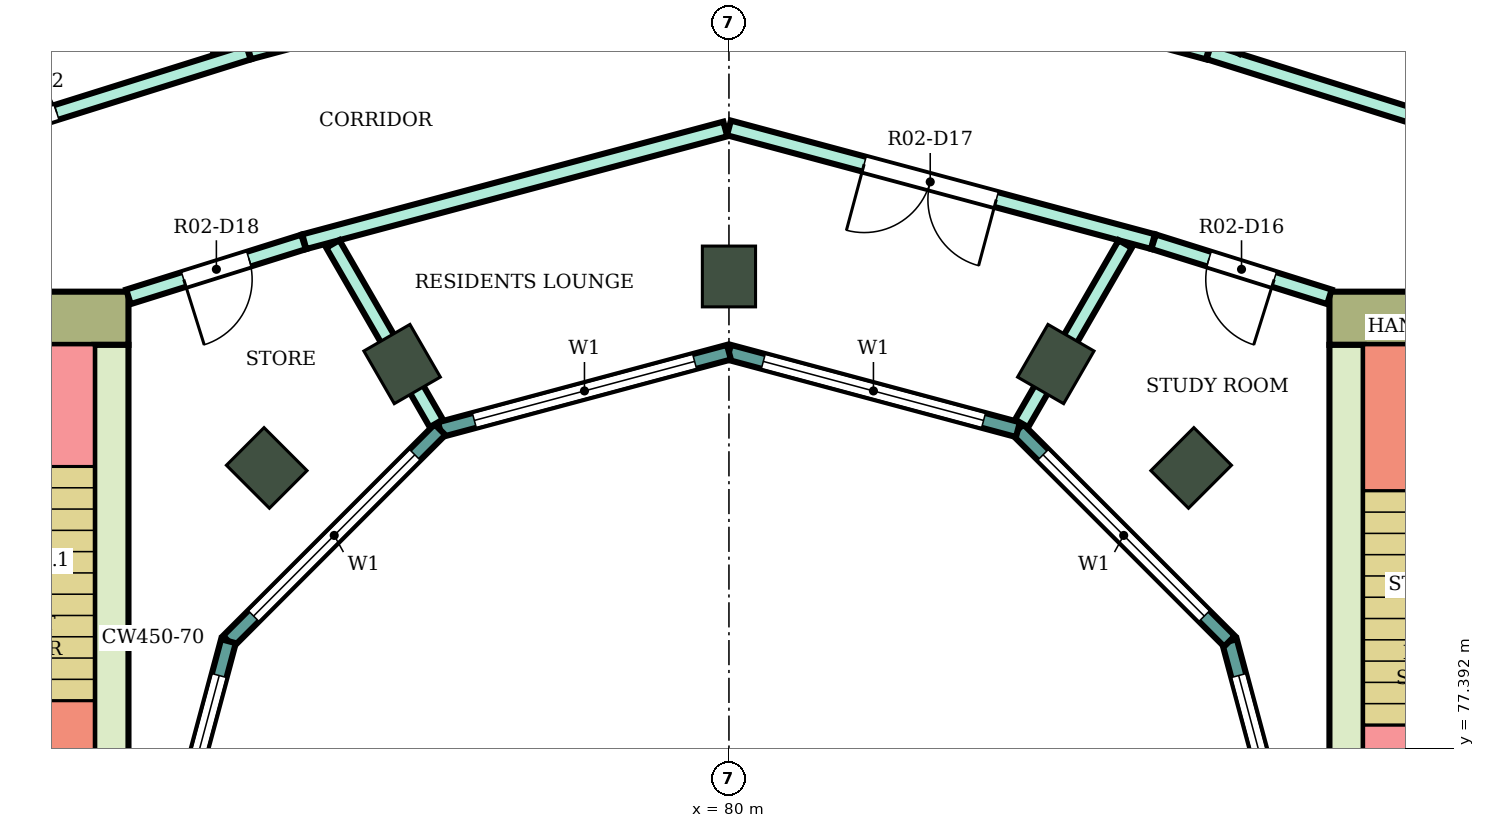
"""IFC4 building model, lengths in metres.
Left out: names, types, materials, properties, quantities, classifications, styles, units other than length and angle.
Written with IfcOpenShell. Run it as: python <this file> out.ifc"""

import sys

from ifc_helpers import new_model, si_unit, direction, frame, frame_2d, origin, origin_2d, place, context, subcontext, project, spatial, rectangle, extrude, element, fill, save


model = new_model("IFC4")
c1 = context("Model", 3, precision=1e-05, world=origin(), true_north=direction((0.0, 1.0)))
c2 = subcontext(c1, "Body", "Model", "MODEL_VIEW")
j1 = project(units=[si_unit("LENGTHUNIT", "METRE"), si_unit("PLANEANGLEUNIT", "RADIAN")], contexts=[c1])
p1 = place(None, origin())
s1 = spatial("IfcSite", under=j1, at=p1, CompositionType="ELEMENT")
p2 = place(p1, origin())
s2 = spatial("IfcBuilding", under=s1, at=p2, CompositionType="ELEMENT")
p3 = place(p2, frame((0.0, 0.0, 178.2)))
s3 = spatial("IfcBuildingStorey", under=s2, at=p3, CompositionType="ELEMENT", Elevation=178.2)
for number, where, z_axis, x_axis in (
    (1, (86.081, 81.081, 0.0), (0.0, 0.0, 1.0), (0.707, 0.707, 0.0)),
    (2, (84.3, 82.448, 0.0), (0.0, 0.0, 1.0), (0.5, 0.866, 0.0)),
    (3, (80.0, 83.6, 0.0), (0.0, 0.0, 1.0), (0.0, 1.0, 0.0)),
    (4, (75.7, 82.448, 0.0), (0.0, 0.0, 1.0), (-0.5, 0.866, 0.0)),
    (5, (73.919, 81.081, 0.0), (0.0, 0.0, 1.0), (-0.707, 0.707, 0.0)),
):
    element("IfcColumn", number, at=place(p3, frame(where, z_axis=z_axis, x_axis=x_axis)), inside=s3, PredefinedType="COLUMN", context=c2, shape_type="SweptSolid", body=[
        extrude(rectangle(XDim=0.8, YDim=0.7, at=origin_2d()), origin(), (0.0, 0.0, 1.0), 4.1),
    ])
p4 = place(p3, frame((87.9, 83.05, 0.0), z_axis=(0.0, 0.0, 1.0), x_axis=(1.0, 0.0, 0.0)))
e6 = element("IfcWall", 6, at=p4, inside=s3, PredefinedType="SHEAR", context=c2, shape_type="SweptSolid", body=[
    extrude(rectangle(XDim=14.8, YDim=0.7, at=frame_2d((7.4, 0.0))), origin(), (0.0, 0.0, 1.0), 3.78),
])
p5 = place(p4, frame((4.2, 0.0, 0.0)))
e7 = element("IfcOpeningElement", 7, at=p5, cuts=e6, PredefinedType="OPENING", context=c2, shape_type="SweptSolid", body=[
    extrude(rectangle(XDim=2.4, YDim=2.4, at=frame_2d((1.2, 1.2))), frame((0.0, 0.36, 0.0), z_axis=(0.0, -1.0, 0.0), x_axis=(1.0, 0.0, 0.0)), (0.0, 0.0, 1.0), 0.72),
])
p6 = place(p3, frame((88.125, 75.0, 0.0), z_axis=(0.0, 0.0, 1.0), x_axis=(0.0, 1.0, 0.0)))
e8 = element("IfcWall", 8, at=p6, inside=s3, PredefinedType="SHEAR", context=c2, shape_type="SweptSolid", body=[
    extrude(rectangle(XDim=7.7, YDim=0.45, at=frame_2d((3.85, 0.0))), origin(), (0.0, 0.0, 1.0), 3.78),
])
p7 = place(p3, frame((72.1, 83.05, 0.0), z_axis=(0.0, 0.0, 1.0), x_axis=(-1.0, 0.0, 0.0)))
e9 = element("IfcWall", 9, at=p7, inside=s3, PredefinedType="SHEAR", context=c2, shape_type="SweptSolid", body=[
    extrude(rectangle(XDim=14.8, YDim=0.7, at=frame_2d((7.4, 0.0))), origin(), (0.0, 0.0, 1.0), 3.78),
])
p8 = place(p7, frame((4.2, 0.0, 0.0)))
e10 = element("IfcOpeningElement", 10, at=p8, cuts=e9, PredefinedType="OPENING", context=c2, shape_type="SweptSolid", body=[
    extrude(rectangle(XDim=2.4, YDim=2.4, at=frame_2d((1.2, 1.2))), frame((0.0, 0.36, 0.0), z_axis=(0.0, -1.0, 0.0), x_axis=(1.0, 0.0, 0.0)), (0.0, 0.0, 1.0), 0.72),
])
p9 = place(p3, frame((71.875, 82.7, 0.0), z_axis=(0.0, 0.0, 1.0), x_axis=(0.0, -1.0, 0.0)))
e11 = element("IfcWall", 11, at=p9, inside=s3, PredefinedType="SHEAR", context=c2, shape_type="SweptSolid", body=[
    extrude(rectangle(XDim=7.7, YDim=0.45, at=frame_2d((3.85, 0.0))), origin(), (0.0, 0.0, 1.0), 3.78),
])
p10 = place(p3, frame((87.604, 75.0, 0.0), z_axis=(0.0, 0.0, 1.0), x_axis=(-0.258789828301, 0.965933654434, 0.0)))
e12 = element("IfcWall", 12, at=p10, inside=s3, PredefinedType="NOTDEFINED", context=c2, shape_type="SweptSolid", body=[
    extrude(rectangle(XDim=3.936, YDim=0.2, at=frame_2d((1.968, 0.0))), origin(), (0.0, 0.0, 1.0), 4.1),
])
p11 = place(p10, frame((0.468, 0.0, 0.9)))
e13 = element("IfcOpeningElement", 13, at=p11, cuts=e12, PredefinedType="OPENING", context=c2, shape_type="SweptSolid", body=[
    extrude(rectangle(XDim=3.0, YDim=2.3, at=frame_2d((1.5, 1.15))), frame((0.0, 0.11, 0.0), z_axis=(0.0, -1.0, 0.0), x_axis=(1.0, 0.0, 0.0)), (0.0, 0.0, 1.0), 0.22),
])
p12 = place(p3, frame((86.585, 78.802, 0.0), z_axis=(0.0, 0.0, 1.0), x_axis=(-0.707106781187, 0.707106781187, 0.0)))
e14 = element("IfcWall", 14, at=p12, inside=s3, PredefinedType="NOTDEFINED", context=c2, shape_type="SweptSolid", body=[
    extrude(rectangle(XDim=3.936, YDim=0.2, at=frame_2d((1.968, 0.0))), origin(), (0.0, 0.0, 1.0), 4.1),
])
p13 = place(p12, frame((0.468, 0.0, 0.9)))
e15 = element("IfcOpeningElement", 15, at=p13, cuts=e14, PredefinedType="OPENING", context=c2, shape_type="SweptSolid", body=[
    extrude(rectangle(XDim=3.0, YDim=2.3, at=frame_2d((1.5, 1.15))), frame((0.0, 0.11, 0.0), z_axis=(0.0, -1.0, 0.0), x_axis=(1.0, 0.0, 0.0)), (0.0, 0.0, 1.0), 0.22),
])
p14 = place(p3, frame((83.802, 81.585, 0.0), z_axis=(0.0, 0.0, 1.0), x_axis=(-0.965933654434, 0.258789828301, 0.0)))
e16 = element("IfcWall", 16, at=p14, inside=s3, PredefinedType="NOTDEFINED", context=c2, shape_type="SweptSolid", body=[
    extrude(rectangle(XDim=3.936, YDim=0.2, at=frame_2d((1.968, 0.0))), origin(), (0.0, 0.0, 1.0), 4.1),
])
p15 = place(p14, frame((0.468, 0.0, 0.9)))
e17 = element("IfcOpeningElement", 17, at=p15, cuts=e16, PredefinedType="OPENING", context=c2, shape_type="SweptSolid", body=[
    extrude(rectangle(XDim=3.0, YDim=2.3, at=frame_2d((1.5, 1.15))), frame((0.0, 0.11, 0.0), z_axis=(0.0, -1.0, 0.0), x_axis=(1.0, 0.0, 0.0)), (0.0, 0.0, 1.0), 0.22),
])
p16 = place(p3, frame((80.0, 82.604, 0.0), z_axis=(0.0, 0.0, 1.0), x_axis=(-0.965933654434, -0.258789828301, 0.0)))
e18 = element("IfcWall", 18, at=p16, inside=s3, PredefinedType="NOTDEFINED", context=c2, shape_type="SweptSolid", body=[
    extrude(rectangle(XDim=3.936, YDim=0.2, at=frame_2d((1.968, 0.0))), origin(), (0.0, 0.0, 1.0), 4.1),
])
p17 = place(p16, frame((0.468, 0.0, 0.9)))
e19 = element("IfcOpeningElement", 19, at=p17, cuts=e18, PredefinedType="OPENING", context=c2, shape_type="SweptSolid", body=[
    extrude(rectangle(XDim=3.0, YDim=2.3, at=frame_2d((1.5, 1.15))), frame((0.0, 0.11, 0.0), z_axis=(0.0, -1.0, 0.0), x_axis=(1.0, 0.0, 0.0)), (0.0, 0.0, 1.0), 0.22),
])
p18 = place(p3, frame((76.198, 81.585, 0.0), z_axis=(0.0, 0.0, 1.0), x_axis=(-0.707106781187, -0.707106781187, 0.0)))
e20 = element("IfcWall", 20, at=p18, inside=s3, PredefinedType="NOTDEFINED", context=c2, shape_type="SweptSolid", body=[
    extrude(rectangle(XDim=3.936, YDim=0.2, at=frame_2d((1.968, 0.0))), origin(), (0.0, 0.0, 1.0), 4.1),
])
p19 = place(p18, frame((0.468, 0.0, 0.9)))
e21 = element("IfcOpeningElement", 21, at=p19, cuts=e20, PredefinedType="OPENING", context=c2, shape_type="SweptSolid", body=[
    extrude(rectangle(XDim=3.0, YDim=2.3, at=frame_2d((1.5, 1.15))), frame((0.0, 0.11, 0.0), z_axis=(0.0, -1.0, 0.0), x_axis=(1.0, 0.0, 0.0)), (0.0, 0.0, 1.0), 0.22),
])
p20 = place(p3, frame((73.415, 78.802, 0.0), z_axis=(0.0, 0.0, 1.0), x_axis=(-0.258789828301, -0.965933654434, 0.0)))
e22 = element("IfcWall", 22, at=p20, inside=s3, PredefinedType="NOTDEFINED", context=c2, shape_type="SweptSolid", body=[
    extrude(rectangle(XDim=3.936, YDim=0.2, at=frame_2d((1.968, 0.0))), origin(), (0.0, 0.0, 1.0), 4.1),
])
p21 = place(p20, frame((0.468, 0.0, 0.9)))
e23 = element("IfcOpeningElement", 23, at=p21, cuts=e22, PredefinedType="OPENING", context=c2, shape_type="SweptSolid", body=[
    extrude(rectangle(XDim=3.0, YDim=2.3, at=frame_2d((1.5, 1.15))), frame((0.0, 0.11, 0.0), z_axis=(0.0, -1.0, 0.0), x_axis=(1.0, 0.0, 0.0)), (0.0, 0.0, 1.0), 0.22),
])
p22 = place(p3, frame((67.104, 97.343, 0.0), z_axis=(0.0, 0.0, 1.0), x_axis=(0.499841888023, -0.866116670534, 0.0)))
e24 = element("IfcWall", 24, at=p22, inside=s3, PredefinedType="PARTITIONING", context=c2, shape_type="SweptSolid", body=[
    extrude(rectangle(XDim=12.446, YDim=0.2, at=frame_2d((6.223, 0.0))), origin(), (0.0, 0.0, 1.0), 3.65),
])
p23 = place(p3, frame((68.2, 84.833, 0.0), z_axis=(0.0, 0.0, 1.0), x_axis=(0.954191968402, 0.299195065863, 0.0)))
e25 = element("IfcWall", 25, at=p23, inside=s3, PredefinedType="PARTITIONING", context=c2, shape_type="SweptSolid", body=[
    extrude(rectangle(XDim=5.74, YDim=0.2, at=frame_2d((2.87, 0.0))), origin(), (0.0, 0.0, 1.0), 3.65),
])
p24 = place(p23, frame((2.097, 0.0, 0.0)))
e26 = element("IfcOpeningElement", 26, at=p24, cuts=e25, PredefinedType="OPENING", context=c2, shape_type="SweptSolid", body=[
    extrude(rectangle(XDim=1.0, YDim=2.1, at=frame_2d((0.5, 1.05))), frame((0.0, 0.11, 0.0), z_axis=(0.0, -1.0, 0.0), x_axis=(1.0, 0.0, 0.0)), (0.0, 0.0, 1.0), 0.22),
])
p25 = place(p3, frame((72.1, 83.332, 0.0), z_axis=(0.0, 0.0, 1.0), x_axis=(0.954233106619, 0.299063836383, 0.0)))
e27 = element("IfcWall", 27, at=p25, inside=s3, PredefinedType="PARTITIONING", context=c2, shape_type="SweptSolid", body=[
    extrude(rectangle(XDim=2.414, YDim=0.2, at=frame_2d((1.207, 0.0))), origin(), (0.0, 0.0, 1.0), 3.65),
])
p26 = place(p25, frame((0.762, 0.0, 0.0)))
e28 = element("IfcOpeningElement", 28, at=p26, cuts=e27, PredefinedType="OPENING", context=c2, shape_type="SweptSolid", body=[
    extrude(rectangle(XDim=0.9, YDim=2.1, at=frame_2d((0.45, 1.05))), frame((0.0, 0.11, 0.0), z_axis=(0.0, -1.0, 0.0), x_axis=(1.0, 0.0, 0.0)), (0.0, 0.0, 1.0), 0.22),
])
p27 = place(p3, frame((73.687, 86.554, 0.0), z_axis=(0.0, 0.0, 1.0), x_axis=(0.96595928904, 0.258694128106, 0.0)))
e29 = element("IfcWall", 29, at=p27, inside=s3, PredefinedType="PARTITIONING", context=c2, shape_type="SweptSolid", body=[
    extrude(rectangle(XDim=6.496, YDim=0.2, at=frame_2d((3.248, 0.0))), origin(), (0.0, 0.0, 1.0), 3.65),
])
p28 = place(p3, frame((74.413, 84.057, 0.0), z_axis=(0.0, 0.0, 1.0), x_axis=(0.965970849692, 0.258650956976, 0.0)))
e30 = element("IfcWall", 30, at=p28, inside=s3, PredefinedType="PARTITIONING", context=c2, shape_type="SweptSolid", body=[
    extrude(rectangle(XDim=5.734, YDim=0.2, at=frame_2d((2.867, 0.0))), origin(), (0.0, 0.0, 1.0), 3.65),
])
p29 = place(p3, frame((74.788, 84.028, 0.0), z_axis=(0.0, 0.0, 1.0), x_axis=(0.499859501914, -0.866106505198, 0.0)))
e31 = element("IfcWall", 31, at=p29, inside=s3, PredefinedType="PARTITIONING", context=c2, shape_type="SweptSolid", body=[
    extrude(rectangle(XDim=2.724, YDim=0.2, at=frame_2d((1.362, 0.0))), origin(), (0.0, 0.0, 1.0), 3.65),
])
p30 = place(p3, frame((80.0, 85.554, 0.0), z_axis=(0.0, 0.0, 1.0), x_axis=(0.965894438951, -0.258936155845, 0.0)))
e32 = element("IfcWall", 32, at=p30, inside=s3, PredefinedType="PARTITIONING", context=c2, shape_type="SweptSolid", body=[
    extrude(rectangle(XDim=5.774, YDim=0.2, at=frame_2d((2.887, 0.0))), origin(), (0.0, 0.0, 1.0), 3.65),
])
p31 = place(p30, frame((1.841, 0.0, 0.0)))
e33 = element("IfcOpeningElement", 33, at=p31, cuts=e32, PredefinedType="OPENING", context=c2, shape_type="SweptSolid", body=[
    extrude(rectangle(XDim=1.8, YDim=2.1, at=frame_2d((0.9, 1.05))), frame((0.0, 0.11, 0.0), z_axis=(0.0, -1.0, 0.0), x_axis=(1.0, 0.0, 0.0)), (0.0, 0.0, 1.0), 0.22),
])
p32 = place(p3, frame((80.049, 88.237, 0.0), z_axis=(0.0, 0.0, 1.0), x_axis=(0.965582990495, -0.260095152718, 0.0)))
e34 = element("IfcWall", 34, at=p32, inside=s3, PredefinedType="PARTITIONING", context=c2, shape_type="SweptSolid", body=[
    extrude(rectangle(XDim=6.476, YDim=0.2, at=frame_2d((3.238, 0.0))), origin(), (0.0, 0.0, 1.0), 3.65),
])
p33 = place(p32, frame((0.5, 0.0, 0.0)))
e35 = element("IfcOpeningElement", 35, at=p33, cuts=e34, PredefinedType="OPENING", context=c2, shape_type="SweptSolid", body=[
    extrude(rectangle(XDim=1.0, YDim=2.1, at=frame_2d((0.5, 1.05))), frame((0.0, 0.11, 0.0), z_axis=(0.0, -1.0, 0.0), x_axis=(1.0, 0.0, 0.0)), (0.0, 0.0, 1.0), 0.22),
])
p34 = place(p3, frame((83.851, 81.667, 0.0), z_axis=(0.0, 0.0, 1.0), x_axis=(0.500099931433, 0.865967700657, 0.0)))
e36 = element("IfcWall", 36, at=p34, inside=s3, PredefinedType="PARTITIONING", context=c2, shape_type="SweptSolid", body=[
    extrude(rectangle(XDim=2.725, YDim=0.2, at=frame_2d((1.362, 0.0))), origin(), (0.0, 0.0, 1.0), 3.65),
])
p35 = place(p3, frame((85.587, 84.057, 0.0), z_axis=(0.0, 0.0, 1.0), x_axis=(0.954239513179, -0.299043393987, 0.0)))
e37 = element("IfcWall", 37, at=p35, inside=s3, PredefinedType="PARTITIONING", context=c2, shape_type="SweptSolid", body=[
    extrude(rectangle(XDim=2.424, YDim=0.2, at=frame_2d((1.212, 0.0))), origin(), (0.0, 0.0, 1.0), 3.65),
])
p36 = place(p35, frame((0.762, 0.0, 0.0)))
e38 = element("IfcOpeningElement", 38, at=p36, cuts=e37, PredefinedType="OPENING", context=c2, shape_type="SweptSolid", body=[
    extrude(rectangle(XDim=0.9, YDim=2.1, at=frame_2d((0.45, 1.05))), frame((0.0, 0.11, 0.0), z_axis=(0.0, -1.0, 0.0), x_axis=(1.0, 0.0, 0.0)), (0.0, 0.0, 1.0), 0.22),
])
p37 = place(p3, frame((86.313, 86.554, 0.0), z_axis=(0.0, 0.0, 1.0), x_axis=(0.954081217458, -0.299548043717, 0.0)))
e39 = element("IfcWall", 39, at=p37, inside=s3, PredefinedType="PARTITIONING", context=c2, shape_type="SweptSolid", body=[
    extrude(rectangle(XDim=5.721, YDim=0.2, at=frame_2d((2.86, 0.0))), origin(), (0.0, 0.0, 1.0), 3.65),
])
p38 = place(p3, frame((86.672, 86.554, 0.0), z_axis=(0.0, 0.0, 1.0), x_axis=(0.500043115992, 0.866000509324, 0.0)))
e40 = element("IfcWall", 40, at=p38, inside=s3, PredefinedType="PARTITIONING", context=c2, shape_type="SweptSolid", body=[
    extrude(rectangle(XDim=12.456, YDim=0.1, at=frame_2d((6.228, 0.0))), origin(), (0.0, 0.0, 1.0), 3.65),
])
p39 = place(p38, frame((8.956, 0.0, 0.0)))
e41 = element("IfcOpeningElement", 41, at=p39, cuts=e40, PredefinedType="OPENING", context=c2, shape_type="SweptSolid", body=[
    extrude(rectangle(XDim=0.9, YDim=2.1, at=frame_2d((0.45, 1.05))), frame((0.0, 0.06, 0.0), z_axis=(0.0, -1.0, 0.0), x_axis=(1.0, 0.0, 0.0)), (0.0, 0.0, 1.0), 0.12),
])
p40 = place(p11, origin())
e42 = element("IfcWindow", 42, at=p40, inside=s3, PartitioningType="SINGLE_PANEL", PredefinedType="WINDOW", context=c2, shape_type="SweptSolid", body=[
    extrude(rectangle(XDim=3.0, YDim=2.3, at=frame_2d((1.5, 1.15))), frame((0.0, 0.03, 0.0), z_axis=(0.0, -1.0, 0.0), x_axis=(1.0, 0.0, 0.0)), (0.0, 0.0, 1.0), 0.06),
])
fill(e13, e42)
p41 = place(p13, origin())
e43 = element("IfcWindow", 43, at=p41, inside=s3, PartitioningType="SINGLE_PANEL", PredefinedType="WINDOW", context=c2, shape_type="SweptSolid", body=[
    extrude(rectangle(XDim=3.0, YDim=2.3, at=frame_2d((1.5, 1.15))), frame((0.0, 0.03, 0.0), z_axis=(0.0, -1.0, 0.0), x_axis=(1.0, 0.0, 0.0)), (0.0, 0.0, 1.0), 0.06),
])
fill(e15, e43)
p42 = place(p15, origin())
e44 = element("IfcWindow", 44, at=p42, inside=s3, PartitioningType="SINGLE_PANEL", PredefinedType="WINDOW", context=c2, shape_type="SweptSolid", body=[
    extrude(rectangle(XDim=3.0, YDim=2.3, at=frame_2d((1.5, 1.15))), frame((0.0, 0.03, 0.0), z_axis=(0.0, -1.0, 0.0), x_axis=(1.0, 0.0, 0.0)), (0.0, 0.0, 1.0), 0.06),
])
fill(e17, e44)
p43 = place(p17, origin())
e45 = element("IfcWindow", 45, at=p43, inside=s3, PartitioningType="SINGLE_PANEL", PredefinedType="WINDOW", context=c2, shape_type="SweptSolid", body=[
    extrude(rectangle(XDim=3.0, YDim=2.3, at=frame_2d((1.5, 1.15))), frame((0.0, 0.03, 0.0), z_axis=(0.0, -1.0, 0.0), x_axis=(1.0, 0.0, 0.0)), (0.0, 0.0, 1.0), 0.06),
])
fill(e19, e45)
p44 = place(p19, origin())
e46 = element("IfcWindow", 46, at=p44, inside=s3, PartitioningType="SINGLE_PANEL", PredefinedType="WINDOW", context=c2, shape_type="SweptSolid", body=[
    extrude(rectangle(XDim=3.0, YDim=2.3, at=frame_2d((1.5, 1.15))), frame((0.0, 0.03, 0.0), z_axis=(0.0, -1.0, 0.0), x_axis=(1.0, 0.0, 0.0)), (0.0, 0.0, 1.0), 0.06),
])
fill(e21, e46)
p45 = place(p21, origin())
e47 = element("IfcWindow", 47, at=p45, inside=s3, PartitioningType="SINGLE_PANEL", PredefinedType="WINDOW", context=c2, shape_type="SweptSolid", body=[
    extrude(rectangle(XDim=3.0, YDim=2.3, at=frame_2d((1.5, 1.15))), frame((0.0, 0.03, 0.0), z_axis=(0.0, -1.0, 0.0), x_axis=(1.0, 0.0, 0.0)), (0.0, 0.0, 1.0), 0.06),
])
fill(e23, e47)
p46 = place(p24, origin())
e48 = element("IfcDoor", 48, at=p46, inside=s3, OperationType="SINGLE_SWING_LEFT", PredefinedType="DOOR", context=c2, shape_type="SweptSolid", body=[
    extrude(rectangle(XDim=1.0, YDim=2.1, at=frame_2d((0.5, 1.05))), frame((0.0, 0.025, 0.0), z_axis=(0.0, -1.0, 0.0), x_axis=(1.0, 0.0, 0.0)), (0.0, 0.0, 1.0), 0.05),
])
fill(e26, e48)
p47 = place(p36, frame((0.9, 0.0, 0.0), z_axis=(0.0, 0.0, 1.0), x_axis=(-1.0, 0.0, 0.0)))
e49 = element("IfcDoor", 49, at=p47, inside=s3, OperationType="SINGLE_SWING_LEFT", PredefinedType="DOOR", context=c2, shape_type="SweptSolid", body=[
    extrude(rectangle(XDim=0.9, YDim=2.1, at=frame_2d((0.45, 1.05))), frame((0.0, 0.025, 0.0), z_axis=(0.0, -1.0, 0.0), x_axis=(1.0, 0.0, 0.0)), (0.0, 0.0, 1.0), 0.05),
])
fill(e38, e49)
p48 = place(p31, frame((1.8, 0.0, 0.0), z_axis=(0.0, 0.0, 1.0), x_axis=(-1.0, 0.0, 0.0)))
e50 = element("IfcDoor", 50, at=p48, inside=s3, OperationType="DOUBLE_DOOR_SINGLE_SWING", PredefinedType="DOOR", context=c2, shape_type="SweptSolid", body=[
    extrude(rectangle(XDim=1.8, YDim=2.1, at=frame_2d((0.9, 1.05))), frame((0.0, 0.025, 0.0), z_axis=(0.0, -1.0, 0.0), x_axis=(1.0, 0.0, 0.0)), (0.0, 0.0, 1.0), 0.05),
])
fill(e33, e50)
p49 = place(p26, frame((0.9, 0.0, 0.0), z_axis=(0.0, 0.0, 1.0), x_axis=(-1.0, 0.0, 0.0)))
e51 = element("IfcDoor", 51, at=p49, inside=s3, OperationType="SINGLE_SWING_RIGHT", PredefinedType="DOOR", context=c2, shape_type="SweptSolid", body=[
    extrude(rectangle(XDim=0.9, YDim=2.1, at=frame_2d((0.45, 1.05))), frame((0.0, 0.025, 0.0), z_axis=(0.0, -1.0, 0.0), x_axis=(1.0, 0.0, 0.0)), (0.0, 0.0, 1.0), 0.05),
])
fill(e28, e51)
save(model, sys.argv[1])
